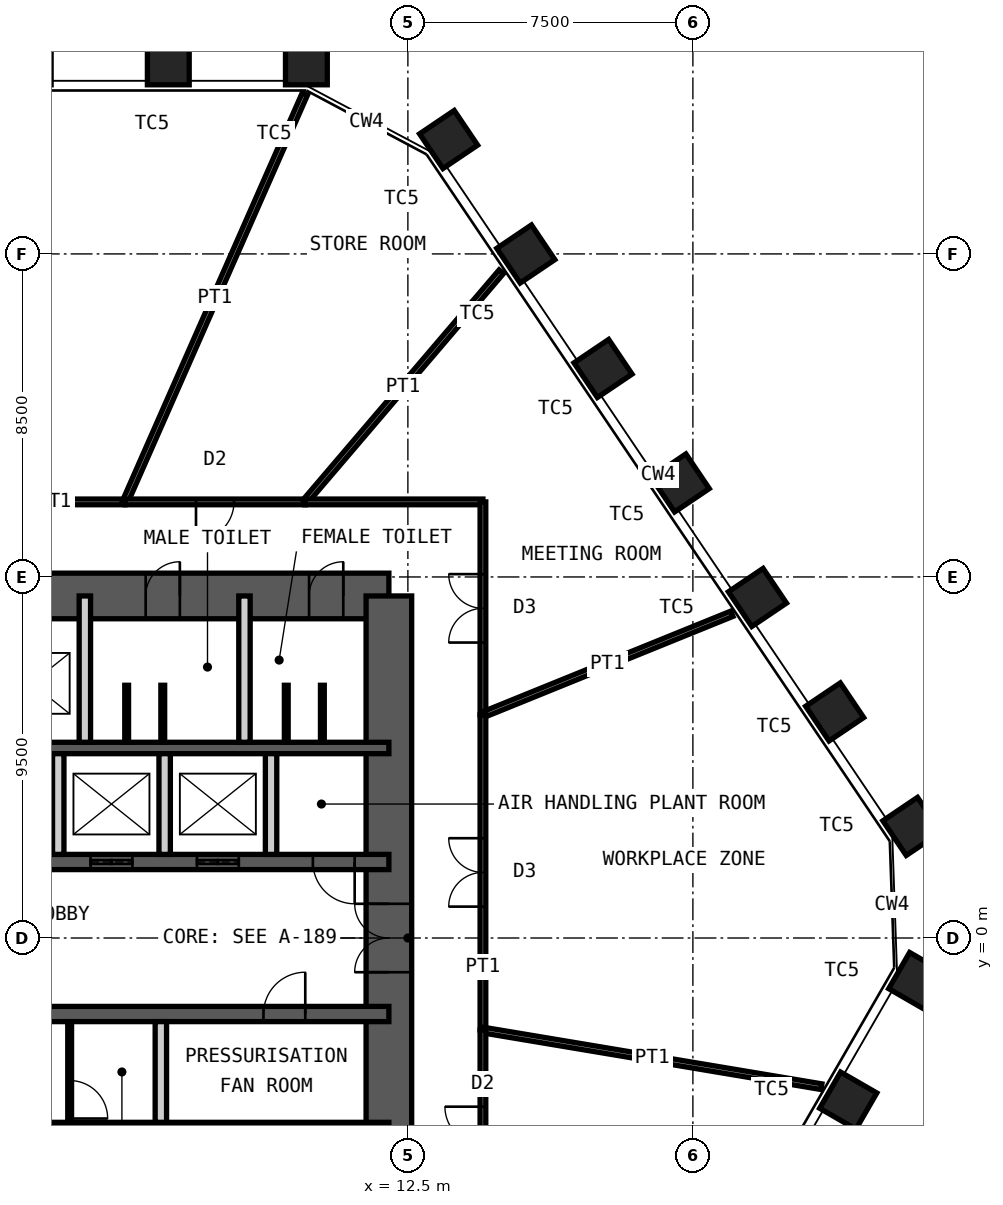
"""IFC4 building model, lengths in metres.
Left out: names, types, materials, properties, quantities, classifications, styles, units other than length and angle.
Written with IfcOpenShell. Run it as: python <this file> out.ifc"""

import sys

from ifc_helpers import new_model, si_unit, direction, frame, frame_2d, origin, origin_2d, place, context, subcontext, project, spatial, rectangle, hollow_rectangle, extrude, element, fill, save


model = new_model("IFC4")
c1 = context("Model", 3, precision=1e-05, world=origin(), true_north=direction((0.0, 1.0)))
c2 = subcontext(c1, "Body", "Model", "MODEL_VIEW")
j1 = project(units=[si_unit("LENGTHUNIT", "METRE"), si_unit("PLANEANGLEUNIT", "RADIAN")], contexts=[c1])
p1 = place(None, origin())
s1 = spatial("IfcSite", under=j1, at=p1, CompositionType="ELEMENT")
p2 = place(p1, origin())
s2 = spatial("IfcBuilding", under=s1, at=p2, CompositionType="ELEMENT")
p3 = place(p2, frame((0.0, 0.0, 193.0)))
s3 = spatial("IfcBuildingStorey", under=s2, at=p3, CompositionType="ELEMENT", Elevation=193.0)
for number, where, z_axis, x_axis in (
    (1, (6.196, 23.0, 0.0), (0.0, 0.0, 1.0), (-1.0, 0.0, 0.0)),
    (2, (9.829, 23.0, 0.0), (0.0, 0.0, 1.0), (-1.0, 0.0, 0.0)),
    (3, (13.571, 21.01, 0.0), (0.0, 0.0, 1.0), (-0.559, 0.829, 0.0)),
    (4, (15.603, 17.998, 0.0), (0.0, 0.0, 1.0), (-0.559, 0.829, 0.0)),
    (5, (17.635, 14.986, 0.0), (0.0, 0.0, 1.0), (-0.559, 0.829, 0.0)),
    (6, (19.667, 11.973, 0.0), (0.0, 0.0, 1.0), (-0.559, 0.829, 0.0)),
    (7, (21.699, 8.961, 0.0), (0.0, 0.0, 1.0), (-0.559, 0.829, 0.0)),
    (8, (23.731, 5.948, 0.0), (0.0, 0.0, 1.0), (-0.559, 0.829, 0.0)),
    (9, (25.762, 2.936, 0.0), (0.0, 0.0, 1.0), (-0.559, 0.829, 0.0)),
    (10, (25.905, -1.132, 0.0), (0.0, 0.0, 1.0), (0.5, 0.866, 0.0)),
    (11, (24.088, -4.279, 0.0), (0.0, 0.0, 1.0), (0.5, 0.866, 0.0)),
):
    element("IfcColumn", number, at=place(p3, frame(where, z_axis=z_axis, x_axis=x_axis)), inside=s3, PredefinedType="COLUMN", context=c2, shape_type="SweptSolid", body=[
        extrude(hollow_rectangle(XDim=1.1, YDim=1.1, WallThickness=0.07, at=origin_2d()), origin(), (0.0, 0.0, 1.0), 4.2),
    ])
p4 = place(p3, frame((-12.0, 9.0, 0.0), z_axis=(0.0, 0.0, 1.0), x_axis=(1.0, 0.0, 0.0)))
e12 = element("IfcWall", 12, at=p4, inside=s3, PredefinedType="SHEAR", context=c2, shape_type="SweptSolid", body=[
    extrude(rectangle(XDim=24.0, YDim=1.2, at=frame_2d((12.0, 0.0))), origin(), (0.0, 0.0, 1.0), 4.2),
])
p5 = place(p4, frame((10.4, 0.0, 0.0)))
e13 = element("IfcOpeningElement", 13, at=p5, cuts=e12, PredefinedType="OPENING", context=c2, shape_type="SweptSolid", body=[
    extrude(rectangle(XDim=1.0, YDim=2.1, at=frame_2d((0.5, 1.05))), frame((0.0, 0.61, 0.0), z_axis=(0.0, -1.0, 0.0), x_axis=(1.0, 0.0, 0.0)), (0.0, 0.0, 1.0), 1.22),
])
p6 = place(p4, frame((17.6, 0.0, 0.0)))
e14 = element("IfcOpeningElement", 14, at=p6, cuts=e12, PredefinedType="OPENING", context=c2, shape_type="SweptSolid", body=[
    extrude(rectangle(XDim=0.9, YDim=2.1, at=frame_2d((0.45, 1.05))), frame((0.0, 0.61, 0.0), z_axis=(0.0, -1.0, 0.0), x_axis=(1.0, 0.0, 0.0)), (0.0, 0.0, 1.0), 1.22),
])
p7 = place(p4, frame((21.9, 0.0, 0.0)))
e15 = element("IfcOpeningElement", 15, at=p7, cuts=e12, PredefinedType="OPENING", context=c2, shape_type="SweptSolid", body=[
    extrude(rectangle(XDim=0.9, YDim=2.1, at=frame_2d((0.45, 1.05))), frame((0.0, 0.61, 0.0), z_axis=(0.0, -1.0, 0.0), x_axis=(1.0, 0.0, 0.0)), (0.0, 0.0, 1.0), 1.22),
])
p8 = place(p3, frame((12.0, -9.0, 0.0), z_axis=(0.0, 0.0, 1.0), x_axis=(0.0, 1.0, 0.0)))
e16 = element("IfcWall", 16, at=p8, inside=s3, PredefinedType="SHEAR", context=c2, shape_type="SweptSolid", body=[
    extrude(rectangle(XDim=18.0, YDim=1.2, at=frame_2d((9.0, 0.0))), origin(), (0.0, 0.0, 1.0), 4.2),
])
p9 = place(p8, frame((8.1, 0.0, 0.0)))
e17 = element("IfcOpeningElement", 17, at=p9, cuts=e16, PredefinedType="OPENING", context=c2, shape_type="SweptSolid", body=[
    extrude(rectangle(XDim=1.8, YDim=2.1, at=frame_2d((0.9, 1.05))), frame((0.0, 0.61, 0.0), z_axis=(0.0, -1.0, 0.0), x_axis=(1.0, 0.0, 0.0)), (0.0, 0.0, 1.0), 1.22),
])
p10 = place(p3, frame((-12.0, 5.0, 0.0), z_axis=(0.0, 0.0, 1.0), x_axis=(1.0, 0.0, 0.0)))
e18 = element("IfcWall", 18, at=p10, inside=s3, PredefinedType="SHEAR", context=c2, shape_type="SweptSolid", body=[
    extrude(rectangle(XDim=24.0, YDim=0.3, at=frame_2d((12.0, 0.0))), origin(), (0.0, 0.0, 1.0), 4.2),
])
p11 = place(p3, frame((-12.0, 2.0, 0.0), z_axis=(0.0, 0.0, 1.0), x_axis=(1.0, 0.0, 0.0)))
e19 = element("IfcWall", 19, at=p11, inside=s3, PredefinedType="SHEAR", context=c2, shape_type="SweptSolid", body=[
    extrude(rectangle(XDim=24.0, YDim=0.4, at=frame_2d((12.0, 0.0))), origin(), (0.0, 0.0, 1.0), 4.2),
])
p12 = place(p11, frame((2.4, 0.0, 0.0)))
e20 = element("IfcOpeningElement", 20, at=p12, cuts=e19, PredefinedType="OPENING", context=c2, shape_type="SweptSolid", body=[
    extrude(rectangle(XDim=1.1, YDim=2.1, at=frame_2d((0.55, 1.05))), frame((0.0, 0.21, 0.0), z_axis=(0.0, -1.0, 0.0), x_axis=(1.0, 0.0, 0.0)), (0.0, 0.0, 1.0), 0.42),
])
p13 = place(p11, frame((22.0, 0.0, 0.0)))
e21 = element("IfcOpeningElement", 21, at=p13, cuts=e19, PredefinedType="OPENING", context=c2, shape_type="SweptSolid", body=[
    extrude(rectangle(XDim=1.1, YDim=2.1, at=frame_2d((0.55, 1.05))), frame((0.0, 0.21, 0.0), z_axis=(0.0, -1.0, 0.0), x_axis=(1.0, 0.0, 0.0)), (0.0, 0.0, 1.0), 0.42),
])
p14 = place(p11, frame((10.15, 0.0, 0.0)))
e22 = element("IfcOpeningElement", 22, at=p14, cuts=e19, PredefinedType="OPENING", context=c2, shape_type="SweptSolid", body=[
    extrude(rectangle(XDim=1.0, YDim=2.1, at=frame_2d((0.5, 1.05))), frame((0.0, 0.21, 0.0), z_axis=(0.0, -1.0, 0.0), x_axis=(1.0, 0.0, 0.0)), (0.0, 0.0, 1.0), 0.42),
])
p15 = place(p11, frame((6.9, 0.0, 0.0)))
e23 = element("IfcOpeningElement", 23, at=p15, cuts=e19, PredefinedType="OPENING", context=c2, shape_type="SweptSolid", body=[
    extrude(rectangle(XDim=1.0, YDim=2.1, at=frame_2d((0.5, 1.05))), frame((0.0, 0.21, 0.0), z_axis=(0.0, -1.0, 0.0), x_axis=(1.0, 0.0, 0.0)), (0.0, 0.0, 1.0), 0.42),
])
p16 = place(p11, frame((13.35, 0.0, 0.0)))
e24 = element("IfcOpeningElement", 24, at=p16, cuts=e19, PredefinedType="OPENING", context=c2, shape_type="SweptSolid", body=[
    extrude(rectangle(XDim=1.1, YDim=2.4, at=frame_2d((0.55, 1.2))), frame((0.0, 0.21, 0.0), z_axis=(0.0, -1.0, 0.0), x_axis=(1.0, 0.0, 0.0)), (0.0, 0.0, 1.0), 0.42),
])
p17 = place(p11, frame((16.15, 0.0, 0.0)))
e25 = element("IfcOpeningElement", 25, at=p17, cuts=e19, PredefinedType="OPENING", context=c2, shape_type="SweptSolid", body=[
    extrude(rectangle(XDim=1.1, YDim=2.4, at=frame_2d((0.55, 1.2))), frame((0.0, 0.21, 0.0), z_axis=(0.0, -1.0, 0.0), x_axis=(1.0, 0.0, 0.0)), (0.0, 0.0, 1.0), 0.42),
])
p18 = place(p11, frame((18.95, 0.0, 0.0)))
e26 = element("IfcOpeningElement", 26, at=p18, cuts=e19, PredefinedType="OPENING", context=c2, shape_type="SweptSolid", body=[
    extrude(rectangle(XDim=1.1, YDim=2.4, at=frame_2d((0.55, 1.2))), frame((0.0, 0.21, 0.0), z_axis=(0.0, -1.0, 0.0), x_axis=(1.0, 0.0, 0.0)), (0.0, 0.0, 1.0), 0.42),
])
p19 = place(p3, frame((-12.0, -2.0, 0.0), z_axis=(0.0, 0.0, 1.0), x_axis=(1.0, 0.0, 0.0)))
e27 = element("IfcWall", 27, at=p19, inside=s3, PredefinedType="SHEAR", context=c2, shape_type="SweptSolid", body=[
    extrude(rectangle(XDim=24.0, YDim=0.4, at=frame_2d((12.0, 0.0))), origin(), (0.0, 0.0, 1.0), 4.2),
])
p20 = place(p19, frame((1.1, 0.0, 0.0)))
e28 = element("IfcOpeningElement", 28, at=p20, cuts=e27, PredefinedType="OPENING", context=c2, shape_type="SweptSolid", body=[
    extrude(rectangle(XDim=1.1, YDim=2.1, at=frame_2d((0.55, 1.05))), frame((0.0, 0.21, 0.0), z_axis=(0.0, -1.0, 0.0), x_axis=(1.0, 0.0, 0.0)), (0.0, 0.0, 1.0), 0.42),
])
p21 = place(p19, frame((13.55, 0.0, 0.0)))
e29 = element("IfcOpeningElement", 29, at=p21, cuts=e27, PredefinedType="OPENING", context=c2, shape_type="SweptSolid", body=[
    extrude(rectangle(XDim=1.1, YDim=2.1, at=frame_2d((0.55, 1.05))), frame((0.0, 0.21, 0.0), z_axis=(0.0, -1.0, 0.0), x_axis=(1.0, 0.0, 0.0)), (0.0, 0.0, 1.0), 0.42),
])
p22 = place(p19, frame((20.7, 0.0, 0.0)))
e30 = element("IfcOpeningElement", 30, at=p22, cuts=e27, PredefinedType="OPENING", context=c2, shape_type="SweptSolid", body=[
    extrude(rectangle(XDim=1.1, YDim=2.1, at=frame_2d((0.55, 1.05))), frame((0.0, 0.21, 0.0), z_axis=(0.0, -1.0, 0.0), x_axis=(1.0, 0.0, 0.0)), (0.0, 0.0, 1.0), 0.42),
])
p23 = place(p19, frame((4.0, 0.0, 0.0)))
e31 = element("IfcOpeningElement", 31, at=p23, cuts=e27, PredefinedType="OPENING", context=c2, shape_type="SweptSolid", body=[
    extrude(rectangle(XDim=1.0, YDim=2.1, at=frame_2d((0.5, 1.05))), frame((0.0, 0.21, 0.0), z_axis=(0.0, -1.0, 0.0), x_axis=(1.0, 0.0, 0.0)), (0.0, 0.0, 1.0), 0.42),
])
p24 = place(p19, frame((6.8, 0.0, 0.0)))
e32 = element("IfcOpeningElement", 32, at=p24, cuts=e27, PredefinedType="OPENING", context=c2, shape_type="SweptSolid", body=[
    extrude(rectangle(XDim=1.0, YDim=2.1, at=frame_2d((0.5, 1.05))), frame((0.0, 0.21, 0.0), z_axis=(0.0, -1.0, 0.0), x_axis=(1.0, 0.0, 0.0)), (0.0, 0.0, 1.0), 0.42),
])
p25 = place(p3, frame((-12.0, -5.0, 0.0), z_axis=(0.0, 0.0, 1.0), x_axis=(1.0, 0.0, 0.0)))
e33 = element("IfcWall", 33, at=p25, inside=s3, PredefinedType="SHEAR", context=c2, shape_type="SweptSolid", body=[
    extrude(rectangle(XDim=24.0, YDim=0.3, at=frame_2d((12.0, 0.0))), origin(), (0.0, 0.0, 1.0), 4.2),
])
for number, where, z_axis, x_axis in (
    (34, (4.0, 5.15, 0.0), (0.0, 0.0, 1.0), (0.0, 1.0, 0.0)),
    (35, (8.2, 5.15, 0.0), (0.0, 0.0, 1.0), (0.0, 1.0, 0.0)),
):
    element("IfcWall", number, at=place(p3, frame(where, z_axis=z_axis, x_axis=x_axis)), inside=s3, PredefinedType="PARTITIONING", context=c2, shape_type="SweptSolid", body=[
        extrude(rectangle(XDim=3.85, YDim=0.3, at=frame_2d((1.925, 0.0))), origin(), (0.0, 0.0, 1.0), 3.98),
    ])
for number, where, z_axis, x_axis in (
    (36, (3.3, 2.2, 0.0), (0.0, 0.0, 1.0), (0.0, 1.0, 0.0)),
    (37, (6.1, 2.2, 0.0), (0.0, 0.0, 1.0), (0.0, 1.0, 0.0)),
    (38, (8.9, 2.2, 0.0), (0.0, 0.0, 1.0), (0.0, 1.0, 0.0)),
    (39, (6.0, -4.85, 0.0), (0.0, 0.0, 1.0), (0.0, 1.0, 0.0)),
):
    element("IfcWall", number, at=place(p3, frame(where, z_axis=z_axis, x_axis=x_axis)), inside=s3, PredefinedType="PARTITIONING", context=c2, shape_type="SweptSolid", body=[
        extrude(rectangle(XDim=2.65, YDim=0.3, at=frame_2d((1.325, 0.0))), origin(), (0.0, 0.0, 1.0), 3.98),
    ])
p26 = place(p3, frame((3.6, -4.85, 0.0), z_axis=(0.0, 0.0, 1.0), x_axis=(0.0, 1.0, 0.0)))
e40 = element("IfcWall", 40, at=p26, inside=s3, PredefinedType="PARTITIONING", context=c2, shape_type="SweptSolid", body=[
    extrude(rectangle(XDim=2.65, YDim=0.1, at=frame_2d((1.325, 0.0))), origin(), (0.0, 0.0, 1.0), 3.98),
])
p27 = place(p26, frame((0.1, 0.0, 0.0)))
e41 = element("IfcOpeningElement", 41, at=p27, cuts=e40, PredefinedType="OPENING", context=c2, shape_type="SweptSolid", body=[
    extrude(rectangle(XDim=1.0, YDim=2.4, at=frame_2d((0.5, 1.2))), frame((0.0, 0.06, 0.0), z_axis=(0.0, -1.0, 0.0), x_axis=(1.0, 0.0, 0.0)), (0.0, 0.0, 1.0), 0.12),
])
for number, where, z_axis, x_axis in (
    (42, (5.1, 5.15, 0.0), (0.0, 0.0, 1.0), (0.0, 1.0, 0.0)),
    (43, (6.05, 5.15, 0.0), (0.0, 0.0, 1.0), (0.0, 1.0, 0.0)),
    (44, (9.3, 5.15, 0.0), (0.0, 0.0, 1.0), (0.0, 1.0, 0.0)),
    (45, (10.25, 5.15, 0.0), (0.0, 0.0, 1.0), (0.0, 1.0, 0.0)),
):
    element("IfcWall", number, at=place(p3, frame(where, z_axis=z_axis, x_axis=x_axis)), inside=s3, PredefinedType="PARTITIONING", context=c2, shape_type="SweptSolid", body=[
        extrude(rectangle(XDim=1.5, YDim=0.1, at=frame_2d((0.75, 0.0))), origin(), (0.0, 0.0, 1.0), 2.1),
    ])
p28 = place(p3, frame((-4.291, 11.475, 0.0), z_axis=(0.0, 0.0, 1.0), x_axis=(1.0, 0.0, 0.0)))
e46 = element("IfcWall", 46, at=p28, inside=s3, PredefinedType="PARTITIONING", context=c2, shape_type="SweptSolid", body=[
    extrude(rectangle(XDim=9.349, YDim=0.15, at=frame_2d((4.674, 0.0))), origin(), (0.0, 0.0, 1.0), 4.03),
])
p29 = place(p28, frame((3.774, 0.0, 0.0)))
e47 = element("IfcOpeningElement", 47, at=p29, cuts=e46, PredefinedType="OPENING", context=c2, shape_type="SweptSolid", body=[
    extrude(rectangle(XDim=1.8, YDim=2.4, at=frame_2d((0.9, 1.2))), frame((0.0, 0.085, 0.0), z_axis=(0.0, -1.0, 0.0), x_axis=(1.0, 0.0, 0.0)), (0.0, 0.0, 1.0), 0.17),
])
p30 = place(p3, frame((9.789, 22.208, 0.0), z_axis=(0.0, 0.0, 1.0), x_axis=(-0.403346052835, -0.9150475188, 0.0)))
e48 = element("IfcWall", 48, at=p30, inside=s3, PredefinedType="PARTITIONING", context=c2, shape_type="SweptSolid", body=[
    extrude(rectangle(XDim=11.73, YDim=0.15, at=frame_2d((5.865, 0.0))), origin(), (0.0, 0.0, 1.0), 2.93),
])
p31 = place(p3, frame((5.058, 11.475, 0.0), z_axis=(0.0, 0.0, 1.0), x_axis=(1.0, 0.0, 0.0)))
e49 = element("IfcWall", 49, at=p31, inside=s3, PredefinedType="PARTITIONING", context=c2, shape_type="SweptSolid", body=[
    extrude(rectangle(XDim=4.733, YDim=0.15, at=frame_2d((2.367, 0.0))), origin(), (0.0, 0.0, 1.0), 4.03),
])
p32 = place(p31, frame((1.867, 0.0, 0.0)))
e50 = element("IfcOpeningElement", 50, at=p32, cuts=e49, PredefinedType="OPENING", context=c2, shape_type="SweptSolid", body=[
    extrude(rectangle(XDim=1.0, YDim=2.4, at=frame_2d((0.5, 1.2))), frame((0.0, 0.085, 0.0), z_axis=(0.0, -1.0, 0.0), x_axis=(1.0, 0.0, 0.0)), (0.0, 0.0, 1.0), 0.17),
])
p33 = place(p3, frame((14.958, 17.531, 0.0), z_axis=(0.0, 0.0, 1.0), x_axis=(-0.649097500837, -0.760705221756, 0.0)))
e51 = element("IfcWall", 51, at=p33, inside=s3, PredefinedType="PARTITIONING", context=c2, shape_type="SweptSolid", body=[
    extrude(rectangle(XDim=7.96, YDim=0.15, at=frame_2d((3.98, 0.0))), origin(), (0.0, 0.0, 1.0), 3.43),
])
p34 = place(p3, frame((9.791, 11.475, 0.0), z_axis=(0.0, 0.0, 1.0), x_axis=(1.0, 0.0, 0.0)))
e52 = element("IfcWall", 52, at=p34, inside=s3, PredefinedType="PARTITIONING", context=c2, shape_type="SweptSolid", body=[
    extrude(rectangle(XDim=4.684, YDim=0.15, at=frame_2d((2.342, 0.0))), origin(), (0.0, 0.0, 1.0), 4.03),
])
p35 = place(p3, frame((14.475, 11.475, 0.0), z_axis=(0.0, 0.0, 1.0), x_axis=(0.0, -1.0, 0.0)))
e53 = element("IfcWall", 53, at=p35, inside=s3, PredefinedType="PARTITIONING", context=c2, shape_type="SweptSolid", body=[
    extrude(rectangle(XDim=5.601, YDim=0.15, at=frame_2d((2.801, 0.0))), origin(), (0.0, 0.0, 1.0), 4.03),
])
p36 = place(p35, frame((1.901, 0.0, 0.0)))
e54 = element("IfcOpeningElement", 54, at=p36, cuts=e53, PredefinedType="OPENING", context=c2, shape_type="SweptSolid", body=[
    extrude(rectangle(XDim=1.8, YDim=2.4, at=frame_2d((0.9, 1.2))), frame((0.0, 0.085, 0.0), z_axis=(0.0, -1.0, 0.0), x_axis=(1.0, 0.0, 0.0)), (0.0, 0.0, 1.0), 0.17),
])
p37 = place(p3, frame((21.026, 8.532, 0.0), z_axis=(0.0, 0.0, 1.0), x_axis=(-0.926617028548, -0.376006492503, 0.0)))
e55 = element("IfcWall", 55, at=p37, inside=s3, PredefinedType="PARTITIONING", context=c2, shape_type="SweptSolid", body=[
    extrude(rectangle(XDim=7.07, YDim=0.15, at=frame_2d((3.535, 0.0))), origin(), (0.0, 0.0, 1.0), 3.43),
])
p38 = place(p3, frame((14.475, 5.874, 0.0), z_axis=(0.0, 0.0, 1.0), x_axis=(0.0, -1.0, 0.0)))
e56 = element("IfcWall", 56, at=p38, inside=s3, PredefinedType="PARTITIONING", context=c2, shape_type="SweptSolid", body=[
    extrude(rectangle(XDim=8.296, YDim=0.15, at=frame_2d((4.148, 0.0))), origin(), (0.0, 0.0, 1.0), 4.03),
])
p39 = place(p38, frame((3.248, 0.0, 0.0)))
e57 = element("IfcOpeningElement", 57, at=p39, cuts=e56, PredefinedType="OPENING", context=c2, shape_type="SweptSolid", body=[
    extrude(rectangle(XDim=1.8, YDim=2.4, at=frame_2d((0.9, 1.2))), frame((0.0, 0.085, 0.0), z_axis=(0.0, -1.0, 0.0), x_axis=(1.0, 0.0, 0.0)), (0.0, 0.0, 1.0), 0.17),
])
p40 = place(p3, frame((23.383, -3.912, 0.0), z_axis=(0.0, 0.0, 1.0), x_axis=(-0.986293651891, 0.164999491631, 0.0)))
e58 = element("IfcWall", 58, at=p40, inside=s3, PredefinedType="PARTITIONING", context=c2, shape_type="SweptSolid", body=[
    extrude(rectangle(XDim=9.032, YDim=0.15, at=frame_2d((4.516, 0.0))), origin(), (0.0, 0.0, 1.0), 3.43),
])
p41 = place(p3, frame((14.475, -2.422, 0.0), z_axis=(0.0, 0.0, 1.0), x_axis=(0.0, -1.0, 0.0)))
e59 = element("IfcWall", 59, at=p41, inside=s3, PredefinedType="PARTITIONING", context=c2, shape_type="SweptSolid", body=[
    extrude(rectangle(XDim=5.033, YDim=0.15, at=frame_2d((2.517, 0.0))), origin(), (0.0, 0.0, 1.0), 4.03),
])
p42 = place(p41, frame((2.017, 0.0, 0.0)))
e60 = element("IfcOpeningElement", 60, at=p42, cuts=e59, PredefinedType="OPENING", context=c2, shape_type="SweptSolid", body=[
    extrude(rectangle(XDim=1.0, YDim=2.4, at=frame_2d((0.5, 1.2))), frame((0.0, 0.085, 0.0), z_axis=(0.0, -1.0, 0.0), x_axis=(1.0, 0.0, 0.0)), (0.0, 0.0, 1.0), 0.17),
])
p43 = place(p6, origin())
e61 = element("IfcDoor", 61, at=p43, inside=s3, OperationType="SINGLE_SWING_LEFT", PredefinedType="DOOR", context=c2, shape_type="SweptSolid", body=[
    extrude(rectangle(XDim=0.9, YDim=2.1, at=frame_2d((0.45, 1.05))), frame((0.0, 0.025, 0.0), z_axis=(0.0, -1.0, 0.0), x_axis=(1.0, 0.0, 0.0)), (0.0, 0.0, 1.0), 0.05),
])
fill(e14, e61)
p44 = place(p7, origin())
e62 = element("IfcDoor", 62, at=p44, inside=s3, OperationType="SINGLE_SWING_LEFT", PredefinedType="DOOR", context=c2, shape_type="SweptSolid", body=[
    extrude(rectangle(XDim=0.9, YDim=2.1, at=frame_2d((0.45, 1.05))), frame((0.0, 0.025, 0.0), z_axis=(0.0, -1.0, 0.0), x_axis=(1.0, 0.0, 0.0)), (0.0, 0.0, 1.0), 0.05),
])
fill(e15, e62)
p45 = place(p13, origin())
e63 = element("IfcDoor", 63, at=p45, inside=s3, OperationType="SINGLE_SWING_RIGHT", PredefinedType="DOOR", context=c2, shape_type="SweptSolid", body=[
    extrude(rectangle(XDim=1.1, YDim=2.1, at=frame_2d((0.55, 1.05))), frame((0.0, 0.025, 0.0), z_axis=(0.0, -1.0, 0.0), x_axis=(1.0, 0.0, 0.0)), (0.0, 0.0, 1.0), 0.05),
])
fill(e21, e63)
p46 = place(p22, origin())
e64 = element("IfcDoor", 64, at=p46, inside=s3, OperationType="SINGLE_SWING_LEFT", PredefinedType="DOOR", context=c2, shape_type="SweptSolid", body=[
    extrude(rectangle(XDim=1.1, YDim=2.1, at=frame_2d((0.55, 1.05))), frame((0.0, 0.025, 0.0), z_axis=(0.0, -1.0, 0.0), x_axis=(1.0, 0.0, 0.0)), (0.0, 0.0, 1.0), 0.05),
])
fill(e30, e64)
p47 = place(p9, origin())
e65 = element("IfcDoor", 65, at=p47, inside=s3, OperationType="DOUBLE_DOOR_DOUBLE_SWING", PredefinedType="DOOR", context=c2, shape_type="SweptSolid", body=[
    extrude(rectangle(XDim=1.8, YDim=2.1, at=frame_2d((0.9, 1.05))), frame((0.0, 0.025, 0.0), z_axis=(0.0, -1.0, 0.0), x_axis=(1.0, 0.0, 0.0)), (0.0, 0.0, 1.0), 0.05),
])
fill(e17, e65)
p48 = place(p17, origin())
e66 = element("IfcDoor", 66, at=p48, inside=s3, OperationType="DOUBLE_DOOR_SLIDING", PredefinedType="DOOR", context=c2, shape_type="SweptSolid", body=[
    extrude(rectangle(XDim=1.1, YDim=2.4, at=frame_2d((0.55, 1.2))), frame((0.0, 0.025, 0.0), z_axis=(0.0, -1.0, 0.0), x_axis=(1.0, 0.0, 0.0)), (0.0, 0.0, 1.0), 0.05),
])
fill(e25, e66)
p49 = place(p18, origin())
e67 = element("IfcDoor", 67, at=p49, inside=s3, OperationType="DOUBLE_DOOR_SLIDING", PredefinedType="DOOR", context=c2, shape_type="SweptSolid", body=[
    extrude(rectangle(XDim=1.1, YDim=2.4, at=frame_2d((0.55, 1.2))), frame((0.0, 0.025, 0.0), z_axis=(0.0, -1.0, 0.0), x_axis=(1.0, 0.0, 0.0)), (0.0, 0.0, 1.0), 0.05),
])
fill(e26, e67)
p50 = place(p27, origin())
e68 = element("IfcDoor", 68, at=p50, inside=s3, OperationType="SINGLE_SWING_LEFT", PredefinedType="DOOR", context=c2, shape_type="SweptSolid", body=[
    extrude(rectangle(XDim=1.0, YDim=2.4, at=frame_2d((0.5, 1.2))), frame((0.0, 0.025, 0.0), z_axis=(0.0, -1.0, 0.0), x_axis=(1.0, 0.0, 0.0)), (0.0, 0.0, 1.0), 0.05),
])
fill(e41, e68)
p51 = place(p32, origin())
e69 = element("IfcDoor", 69, at=p51, inside=s3, OperationType="SINGLE_SWING_LEFT", PredefinedType="DOOR", context=c2, shape_type="SweptSolid", body=[
    extrude(rectangle(XDim=1.0, YDim=2.4, at=frame_2d((0.5, 1.2))), frame((0.0, 0.025, 0.0), z_axis=(0.0, -1.0, 0.0), x_axis=(1.0, 0.0, 0.0)), (0.0, 0.0, 1.0), 0.05),
])
fill(e50, e69)
p52 = place(p36, origin())
e70 = element("IfcDoor", 70, at=p52, inside=s3, OperationType="DOUBLE_DOOR_DOUBLE_SWING", PredefinedType="DOOR", context=c2, shape_type="SweptSolid", body=[
    extrude(rectangle(XDim=1.8, YDim=2.4, at=frame_2d((0.9, 1.2))), frame((0.0, 0.025, 0.0), z_axis=(0.0, -1.0, 0.0), x_axis=(1.0, 0.0, 0.0)), (0.0, 0.0, 1.0), 0.05),
])
fill(e54, e70)
p53 = place(p39, origin())
e71 = element("IfcDoor", 71, at=p53, inside=s3, OperationType="DOUBLE_DOOR_DOUBLE_SWING", PredefinedType="DOOR", context=c2, shape_type="SweptSolid", body=[
    extrude(rectangle(XDim=1.8, YDim=2.4, at=frame_2d((0.9, 1.2))), frame((0.0, 0.025, 0.0), z_axis=(0.0, -1.0, 0.0), x_axis=(1.0, 0.0, 0.0)), (0.0, 0.0, 1.0), 0.05),
])
fill(e57, e71)
p54 = place(p42, origin())
e72 = element("IfcDoor", 72, at=p54, inside=s3, OperationType="SINGLE_SWING_LEFT", PredefinedType="DOOR", context=c2, shape_type="SweptSolid", body=[
    extrude(rectangle(XDim=1.0, YDim=2.4, at=frame_2d((0.5, 1.2))), frame((0.0, 0.025, 0.0), z_axis=(0.0, -1.0, 0.0), x_axis=(1.0, 0.0, 0.0)), (0.0, 0.0, 1.0), 0.05),
])
fill(e60, e72)
save(model, sys.argv[1])
